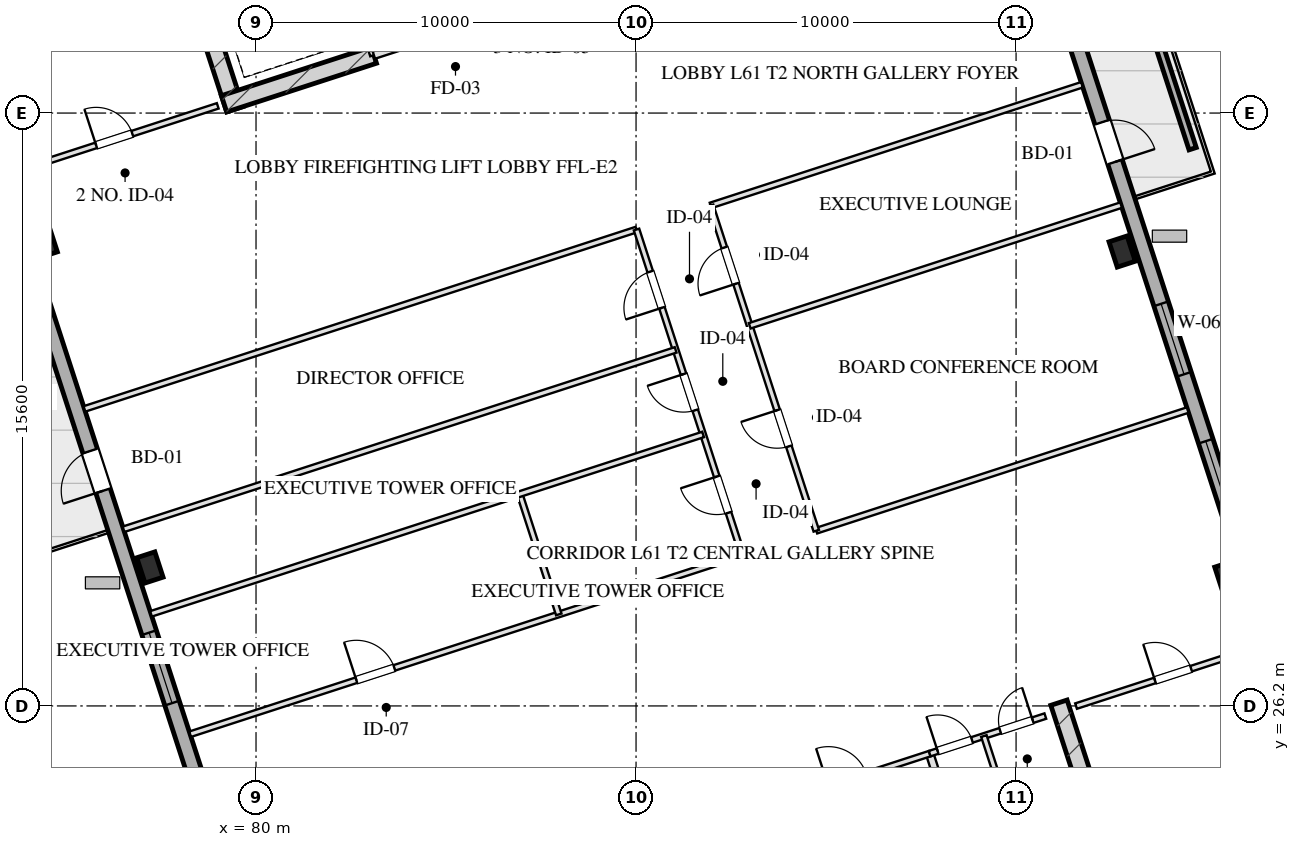
"""IFC4 building model, lengths in metres.
Left out: names, types, materials, properties, quantities, classifications, styles, units other than length and angle.
Written with IfcOpenShell. Run it as: python <this file> out.ifc"""

import sys

from ifc_helpers import new_model, si_unit, direction, frame, frame_2d, origin, origin_2d, place, context, subcontext, project, spatial, rectangle, hollow_rectangle, extrude, element, fill, save


model = new_model("IFC4")
c1 = context("Model", 3, precision=1e-05, world=origin(), true_north=direction((0.0, 1.0)))
c2 = subcontext(c1, "Body", "Model", "MODEL_VIEW")
j1 = project(units=[si_unit("LENGTHUNIT", "METRE"), si_unit("PLANEANGLEUNIT", "RADIAN")], contexts=[c1])
p1 = place(None, origin())
s1 = spatial("IfcSite", under=j1, at=p1, CompositionType="ELEMENT")
p2 = place(p1, origin())
s2 = spatial("IfcBuilding", under=s1, at=p2, CompositionType="ELEMENT")
p3 = place(p2, frame((0.0, 0.0, 226.55)))
s3 = spatial("IfcBuildingStorey", under=s2, at=p3, CompositionType="ELEMENT", Elevation=226.55)
for number, where, z_axis, x_axis in (
    (1, (101.128, 26.286, 0.0), (0.0, 0.0, 1.0), (0.309, -0.951, 0.0)),
    (2, (79.442, 41.899, 0.0), (0.0, 0.0, 1.0), (-0.309, 0.951, 0.0)),
):
    element("IfcWall", number, at=place(p3, frame(where, z_axis=z_axis, x_axis=x_axis)), inside=s3, PredefinedType="SHEAR", context=c2, shape_type="SweptSolid", body=[
        extrude(rectangle(XDim=9.33, YDim=0.45, at=frame_2d((4.665, 0.0))), origin(), (0.0, 0.0, 1.0), 3.45),
    ])
p4 = place(p3, frame((79.159, 42.043, 0.0), z_axis=(0.0, 0.0, 1.0), x_axis=(0.951047485828, 0.309044785913, 0.0)))
e3 = element("IfcWall", 3, at=p4, inside=s3, PredefinedType="SHEAR", context=c2, shape_type="SweptSolid", body=[
    extrude(rectangle(XDim=4.145, YDim=0.45, at=frame_2d((2.073, 0.0))), origin(), (0.0, 0.0, 1.0), 3.45),
])
for number, where, z_axis, x_axis in (
    (4, (77.208, 29.844, 0.0), (0.0, 0.0, 1.0), (0.951, 0.309, 0.0)),
    (5, (74.427, 38.403, 0.0), (0.0, 0.0, 1.0), (0.951, 0.309, 0.0)),
    (6, (105.573, 29.597, 0.0), (0.0, 0.0, 1.0), (0.951, 0.309, 0.0)),
    (7, (102.792, 38.156, 0.0), (0.0, 0.0, 1.0), (0.951, 0.309, 0.0)),
):
    element("IfcColumn", number, at=place(p3, frame(where, z_axis=z_axis, x_axis=x_axis)), inside=s3, PredefinedType="COLUMN", context=c2, shape_type="SweptSolid", body=[
        extrude(hollow_rectangle(XDim=0.5, YDim=0.7, WallThickness=0.025, at=origin_2d()), origin(), (0.0, 0.0, 1.0), 3.451),
    ])
p5 = place(p3, frame((82.618, 11.414, 0.0), z_axis=(0.0, 0.0, 1.0), x_axis=(-0.309016491071, 0.951056679828, 0.0)))
e8 = element("IfcWall", 8, at=p5, inside=s3, PredefinedType="SOLIDWALL", context=c2, shape_type="SweptSolid", body=[
    extrude(rectangle(XDim=38.4, YDim=0.4, at=frame_2d((19.2, 0.0))), origin(), (0.0, 0.0, 1.0), 2.55),
])
p6 = place(p5, frame((11.825, 0.0, 0.75)))
e9 = element("IfcOpeningElement", 9, at=p6, cuts=e8, PredefinedType="OPENING", context=c2, shape_type="SweptSolid", body=[
    extrude(rectangle(XDim=1.95, YDim=1.4, at=frame_2d((0.975, 0.7))), frame((0.0, 0.21, 0.0), z_axis=(0.0, -1.0, 0.0), x_axis=(1.0, 0.0, 0.0)), (0.0, 0.0, 1.0), 0.42),
])
p7 = place(p5, frame((15.625, 0.0, 0.75)))
e10 = element("IfcOpeningElement", 10, at=p7, cuts=e8, PredefinedType="OPENING", context=c2, shape_type="SweptSolid", body=[
    extrude(rectangle(XDim=1.95, YDim=1.4, at=frame_2d((0.975, 0.7))), frame((0.0, 0.21, 0.0), z_axis=(0.0, -1.0, 0.0), x_axis=(1.0, 0.0, 0.0)), (0.0, 0.0, 1.0), 0.42),
])
p8 = place(p5, frame((21.5, 0.0, 0.0)))
e11 = element("IfcOpeningElement", 11, at=p8, cuts=e8, PredefinedType="OPENING", context=c2, shape_type="SweptSolid", body=[
    extrude(rectangle(XDim=1.1, YDim=2.15, at=frame_2d((0.55, 1.075))), frame((0.0, 0.21, 0.0), z_axis=(0.0, -1.0, 0.0), x_axis=(1.0, 0.0, 0.0)), (0.0, 0.0, 1.0), 0.42),
])
p9 = place(p3, frame((97.382, 56.586, 0.0), z_axis=(0.0, 0.0, 1.0), x_axis=(0.309016491071, -0.951056679828, 0.0)))
e12 = element("IfcWall", 12, at=p9, inside=s3, PredefinedType="SOLIDWALL", context=c2, shape_type="SweptSolid", body=[
    extrude(rectangle(XDim=38.4, YDim=0.4, at=frame_2d((19.2, 0.0))), origin(), (0.0, 0.0, 1.0), 2.55),
])
p10 = place(p9, frame((24.625, 0.0, 0.75)))
e13 = element("IfcOpeningElement", 13, at=p10, cuts=e12, PredefinedType="OPENING", context=c2, shape_type="SweptSolid", body=[
    extrude(rectangle(XDim=1.95, YDim=1.4, at=frame_2d((0.975, 0.7))), frame((0.0, 0.21, 0.0), z_axis=(0.0, -1.0, 0.0), x_axis=(1.0, 0.0, 0.0)), (0.0, 0.0, 1.0), 0.42),
])
p11 = place(p9, frame((20.825, 0.0, 0.75)))
e14 = element("IfcOpeningElement", 14, at=p11, cuts=e12, PredefinedType="OPENING", context=c2, shape_type="SweptSolid", body=[
    extrude(rectangle(XDim=1.95, YDim=1.4, at=frame_2d((0.975, 0.7))), frame((0.0, 0.21, 0.0), z_axis=(0.0, -1.0, 0.0), x_axis=(1.0, 0.0, 0.0)), (0.0, 0.0, 1.0), 0.42),
])
p12 = place(p9, frame((15.8, 0.0, 0.0)))
e15 = element("IfcOpeningElement", 15, at=p12, cuts=e12, PredefinedType="OPENING", context=c2, shape_type="SweptSolid", body=[
    extrude(rectangle(XDim=1.1, YDim=2.15, at=frame_2d((0.55, 1.075))), frame((0.0, 0.21, 0.0), z_axis=(0.0, -1.0, 0.0), x_axis=(1.0, 0.0, 0.0)), (0.0, 0.0, 1.0), 0.42),
])
p13 = place(p3, frame((104.646, 40.862, 0.0), z_axis=(0.0, 0.0, 1.0), x_axis=(-0.309032019345, 0.951051634255, 0.0)))
e16 = element("IfcWall", 16, at=p13, inside=s3, PredefinedType="PARAPET", context=c2, shape_type="SweptSolid", body=[
    extrude(rectangle(XDim=4.8, YDim=0.2, at=frame_2d((2.4, 0.0))), origin(), (0.0, 0.0, 1.0), 0.75),
])
p14 = place(p3, frame((97.727, 24.944, 0.0), z_axis=(0.0, 0.0, 1.0), x_axis=(0.309016001439, -0.951056838919, 0.0)))
e17 = element("IfcWall", 17, at=p14, inside=s3, PredefinedType="PARTITIONING", context=c2, shape_type="SweptSolid", body=[
    extrude(rectangle(XDim=8.43, YDim=0.2, at=frame_2d((4.215, 0.0))), origin(), (0.0, 0.0, 1.0), 3.155),
])
p15 = place(p3, frame((93.542, 23.585, 0.0), z_axis=(0.0, 0.0, 1.0), x_axis=(0.951063829732, 0.308994485023, 0.0)))
e18 = element("IfcWall", 18, at=p15, inside=s3, PredefinedType="PARTITIONING", context=c2, shape_type="SweptSolid", body=[
    extrude(rectangle(XDim=4.4, YDim=0.15, at=frame_2d((2.2, 0.0))), origin(), (0.0, 0.0, 1.0), 3.155),
])
p16 = place(p15, frame((1.6, 0.0, 0.0)))
e19 = element("IfcOpeningElement", 19, at=p16, cuts=e18, PredefinedType="OPENING", context=c2, shape_type="SweptSolid", body=[
    extrude(rectangle(XDim=1.05, YDim=2.05, at=frame_2d((0.525, 1.025))), frame((0.0, 0.085, 0.0), z_axis=(0.0, -1.0, 0.0), x_axis=(1.0, 0.0, 0.0)), (0.0, 0.0, 1.0), 0.17),
])
p17 = place(p3, frame((97.727, 24.944, 0.0), z_axis=(0.0, 0.0, 1.0), x_axis=(0.951036872128, 0.309077446369, 0.0)))
e20 = element("IfcWall", 20, at=p17, inside=s3, PredefinedType="PARTITIONING", context=c2, shape_type="SweptSolid", body=[
    extrude(rectangle(XDim=3.2, YDim=0.15, at=frame_2d((1.6, 0.0))), origin(), (0.0, 0.0, 1.0), 3.155),
])
p18 = place(p17, frame((0.22, 0.0, 0.0)))
e21 = element("IfcOpeningElement", 21, at=p18, cuts=e20, PredefinedType="OPENING", context=c2, shape_type="SweptSolid", body=[
    extrude(rectangle(XDim=0.95, YDim=2.05, at=frame_2d((0.475, 1.025))), frame((0.0, 0.085, 0.0), z_axis=(0.0, -1.0, 0.0), x_axis=(1.0, 0.0, 0.0)), (0.0, 0.0, 1.0), 0.17),
])
p19 = place(p17, frame((1.95, 0.0, 0.0)))
e22 = element("IfcOpeningElement", 22, at=p19, cuts=e20, PredefinedType="OPENING", context=c2, shape_type="SweptSolid", body=[
    extrude(rectangle(XDim=0.9, YDim=2.05, at=frame_2d((0.45, 1.025))), frame((0.0, 0.085, 0.0), z_axis=(0.0, -1.0, 0.0), x_axis=(1.0, 0.0, 0.0)), (0.0, 0.0, 1.0), 0.17),
])
p20 = place(p3, frame((99.153, 25.408, 0.0), z_axis=(0.0, 0.0, 1.0), x_axis=(0.309016001439, -0.951056838919, 0.0)))
e23 = element("IfcWall", 23, at=p20, inside=s3, PredefinedType="PARTITIONING", context=c2, shape_type="SweptSolid", body=[
    extrude(rectangle(XDim=8.43, YDim=0.15, at=frame_2d((4.215, 0.0))), origin(), (0.0, 0.0, 1.0), 3.155),
])
p21 = place(p20, frame((2.55, 0.0, 0.0)))
e24 = element("IfcOpeningElement", 24, at=p21, cuts=e23, PredefinedType="OPENING", context=c2, shape_type="SweptSolid", body=[
    extrude(rectangle(XDim=0.95, YDim=2.05, at=frame_2d((0.475, 1.025))), frame((0.0, 0.085, 0.0), z_axis=(0.0, -1.0, 0.0), x_axis=(1.0, 0.0, 0.0)), (0.0, 0.0, 1.0), 0.17),
])
p22 = place(p20, frame((5.6, 0.0, 0.0)))
e25 = element("IfcOpeningElement", 25, at=p22, cuts=e23, PredefinedType="OPENING", context=c2, shape_type="SweptSolid", body=[
    extrude(rectangle(XDim=0.9, YDim=2.05, at=frame_2d((0.45, 1.025))), frame((0.0, 0.085, 0.0), z_axis=(0.0, -1.0, 0.0), x_axis=(1.0, 0.0, 0.0)), (0.0, 0.0, 1.0), 0.17),
])
p23 = place(p3, frame((83.101, 43.324, 0.0), z_axis=(0.0, 0.0, 1.0), x_axis=(-0.309048298632, 0.951046344356, 0.0)))
e26 = element("IfcWall", 26, at=p23, inside=s3, PredefinedType="PARTITIONING", context=c2, shape_type="SweptSolid", body=[
    extrude(rectangle(XDim=1.9, YDim=0.2, at=frame_2d((0.95, 0.0))), origin(), (0.0, 0.0, 1.0), 3.155),
])
p24 = place(p23, frame((0.52, 0.0, 0.0)))
e27 = element("IfcOpeningElement", 27, at=p24, cuts=e26, PredefinedType="OPENING", context=c2, shape_type="SweptSolid", body=[
    extrude(rectangle(XDim=1.1, YDim=2.05, at=frame_2d((0.55, 1.025))), frame((0.0, 0.11, 0.0), z_axis=(0.0, -1.0, 0.0), x_axis=(1.0, 0.0, 0.0)), (0.0, 0.0, 1.0), 0.22),
])
p25 = place(p3, frame((83.101, 43.324, 0.0), z_axis=(0.0, 0.0, 1.0), x_axis=(0.951052804469, 0.309028417967, 0.0)))
e28 = element("IfcWall", 28, at=p25, inside=s3, PredefinedType="PARTITIONING", context=c2, shape_type="SweptSolid", body=[
    extrude(rectangle(XDim=3.83, YDim=0.2, at=frame_2d((1.915, 0.0))), origin(), (0.0, 0.0, 1.0), 3.155),
])
p26 = place(p25, frame((1.35, 0.0, 0.0)))
e29 = element("IfcOpeningElement", 29, at=p26, cuts=e28, PredefinedType="OPENING", context=c2, shape_type="SweptSolid", body=[
    extrude(rectangle(XDim=1.2, YDim=2.05, at=frame_2d((0.6, 1.025))), frame((0.0, 0.11, 0.0), z_axis=(0.0, -1.0, 0.0), x_axis=(1.0, 0.0, 0.0)), (0.0, 0.0, 1.0), 0.22),
])
p27 = place(p3, frame((101.578, 26.196, 0.0), z_axis=(0.0, 0.0, 1.0), x_axis=(0.951064427824, 0.308992644131, 0.0)))
e30 = element("IfcWall", 30, at=p27, inside=s3, PredefinedType="PARTITIONING", context=c2, shape_type="SweptSolid", body=[
    extrude(rectangle(XDim=5.2, YDim=0.15, at=frame_2d((2.6, 0.0))), origin(), (0.0, 0.0, 1.0), 3.155),
])
p28 = place(p27, frame((2.184, 0.0, 0.0)))
e31 = element("IfcOpeningElement", 31, at=p28, cuts=e30, PredefinedType="OPENING", context=c2, shape_type="SweptSolid", body=[
    extrude(rectangle(XDim=1.0, YDim=2.05, at=frame_2d((0.5, 1.025))), frame((0.0, 0.085, 0.0), z_axis=(0.0, -1.0, 0.0), x_axis=(1.0, 0.0, 0.0)), (0.0, 0.0, 1.0), 0.17),
])
p29 = place(p3, frame((73.476, 40.197, 0.0), z_axis=(0.0, 0.0, 1.0), x_axis=(0.951059431056, 0.309008023519, 0.0)))
e32 = element("IfcWall", 32, at=p29, inside=s3, PredefinedType="PARTITIONING", context=c2, shape_type="SweptSolid", body=[
    extrude(rectangle(XDim=5.8, YDim=0.15, at=frame_2d((2.9, 0.0))), origin(), (0.0, 0.0, 1.0), 3.155),
])
p30 = place(p29, frame((2.436, 0.0, 0.0)))
e33 = element("IfcOpeningElement", 33, at=p30, cuts=e32, PredefinedType="OPENING", context=c2, shape_type="SweptSolid", body=[
    extrude(rectangle(XDim=1.0, YDim=2.05, at=frame_2d((0.5, 1.025))), frame((0.0, 0.085, 0.0), z_axis=(0.0, -1.0, 0.0), x_axis=(1.0, 0.0, 0.0)), (0.0, 0.0, 1.0), 0.17),
])
p31 = place(p3, frame((78.266, 25.456, 0.0), z_axis=(0.0, 0.0, 1.0), x_axis=(0.951056617779, 0.30901668204, 0.0)))
e34 = element("IfcWall", 34, at=p31, inside=s3, PredefinedType="PARTITIONING", context=c2, shape_type="SweptSolid", body=[
    extrude(rectangle(XDim=15.275, YDim=0.15, at=frame_2d((7.637, 0.0))), origin(), (0.0, 0.0, 1.0), 3.155),
])
p32 = place(p31, frame((4.6, 0.0, 0.0)))
e35 = element("IfcOpeningElement", 35, at=p32, cuts=e34, PredefinedType="OPENING", context=c2, shape_type="SweptSolid", body=[
    extrude(rectangle(XDim=1.05, YDim=2.05, at=frame_2d((0.525, 1.025))), frame((0.0, 0.085, 0.0), z_axis=(0.0, -1.0, 0.0), x_axis=(1.0, 0.0, 0.0)), (0.0, 0.0, 1.0), 0.17),
])
p33 = place(p3, frame((94.743, 30.81, 0.0), z_axis=(0.0, 0.0, 1.0), x_axis=(0.951058162647, 0.309011927378, 0.0)))
e36 = element("IfcWall", 36, at=p33, inside=s3, PredefinedType="PARTITIONING", context=c2, shape_type="SweptSolid", body=[
    extrude(rectangle(XDim=10.275, YDim=0.15, at=frame_2d((5.137, 0.0))), origin(), (0.0, 0.0, 1.0), 3.155),
])
p34 = place(p3, frame((75.485, 34.015, 0.0), z_axis=(0.0, 0.0, 1.0), x_axis=(0.951056617779, 0.30901668204, 0.0)))
e37 = element("IfcWall", 37, at=p34, inside=s3, PredefinedType="PARTITIONING", context=c2, shape_type="SweptSolid", body=[
    extrude(rectangle(XDim=15.275, YDim=0.15, at=frame_2d((7.637, 0.0))), origin(), (0.0, 0.0, 1.0), 3.155),
])
p35 = place(p3, frame((91.962, 39.369, 0.0), z_axis=(0.0, 0.0, 1.0), x_axis=(0.951058162647, 0.309011927378, 0.0)))
e38 = element("IfcWall", 38, at=p35, inside=s3, PredefinedType="PARTITIONING", context=c2, shape_type="SweptSolid", body=[
    extrude(rectangle(XDim=10.275, YDim=0.15, at=frame_2d((5.137, 0.0))), origin(), (0.0, 0.0, 1.0), 3.155),
])
p36 = place(p3, frame((92.793, 30.176, 0.0), z_axis=(0.0, 0.0, 1.0), x_axis=(-0.309024734286, 0.951054001411, 0.0)))
e39 = element("IfcWall", 39, at=p36, inside=s3, PredefinedType="PARTITIONING", context=c2, shape_type="SweptSolid", body=[
    extrude(rectangle(XDim=9.0, YDim=0.15, at=frame_2d((4.5, 0.0))), origin(), (0.0, 0.0, 1.0), 3.155),
])
p37 = place(p36, frame((1.165, 0.0, 0.0)))
e40 = element("IfcOpeningElement", 40, at=p37, cuts=e39, PredefinedType="OPENING", context=c2, shape_type="SweptSolid", body=[
    extrude(rectangle(XDim=1.0, YDim=2.05, at=frame_2d((0.5, 1.025))), frame((0.0, 0.085, 0.0), z_axis=(0.0, -1.0, 0.0), x_axis=(1.0, 0.0, 0.0)), (0.0, 0.0, 1.0), 0.17),
])
p38 = place(p36, frame((4.0, 0.0, 0.0)))
e41 = element("IfcOpeningElement", 41, at=p38, cuts=e39, PredefinedType="OPENING", context=c2, shape_type="SweptSolid", body=[
    extrude(rectangle(XDim=1.0, YDim=2.05, at=frame_2d((0.5, 1.025))), frame((0.0, 0.085, 0.0), z_axis=(0.0, -1.0, 0.0), x_axis=(1.0, 0.0, 0.0)), (0.0, 0.0, 1.0), 0.17),
])
p39 = place(p36, frame((6.835, 0.0, 0.0)))
e42 = element("IfcOpeningElement", 42, at=p39, cuts=e39, PredefinedType="OPENING", context=c2, shape_type="SweptSolid", body=[
    extrude(rectangle(XDim=1.0, YDim=2.05, at=frame_2d((0.5, 1.025))), frame((0.0, 0.085, 0.0), z_axis=(0.0, -1.0, 0.0), x_axis=(1.0, 0.0, 0.0)), (0.0, 0.0, 1.0), 0.17),
])
p40 = place(p3, frame((94.743, 30.81, 0.0), z_axis=(0.0, 0.0, 1.0), x_axis=(-0.309024734286, 0.951054001411, 0.0)))
e43 = element("IfcWall", 43, at=p40, inside=s3, PredefinedType="PARTITIONING", context=c2, shape_type="SweptSolid", body=[
    extrude(rectangle(XDim=9.0, YDim=0.15, at=frame_2d((4.5, 0.0))), origin(), (0.0, 0.0, 1.0), 3.155),
])
p41 = place(p40, frame((2.335, 0.0, 0.0)))
e44 = element("IfcOpeningElement", 44, at=p41, cuts=e43, PredefinedType="OPENING", context=c2, shape_type="SweptSolid", body=[
    extrude(rectangle(XDim=1.0, YDim=2.05, at=frame_2d((0.5, 1.025))), frame((0.0, 0.085, 0.0), z_axis=(0.0, -1.0, 0.0), x_axis=(1.0, 0.0, 0.0)), (0.0, 0.0, 1.0), 0.17),
])
p42 = place(p40, frame((6.835, 0.0, 0.0)))
e45 = element("IfcOpeningElement", 45, at=p42, cuts=e43, PredefinedType="OPENING", context=c2, shape_type="SweptSolid", body=[
    extrude(rectangle(XDim=1.0, YDim=2.05, at=frame_2d((0.5, 1.025))), frame((0.0, 0.085, 0.0), z_axis=(0.0, -1.0, 0.0), x_axis=(1.0, 0.0, 0.0)), (0.0, 0.0, 1.0), 0.17),
])
p43 = place(p3, frame((87.967, 28.608, 0.0), z_axis=(0.0, 0.0, 1.0), x_axis=(-0.309004845045, 0.951060463766, 0.0)))
e46 = element("IfcWall", 46, at=p43, inside=s3, PredefinedType="PARTITIONING", context=c2, shape_type="SweptSolid", body=[
    extrude(rectangle(XDim=3.33, YDim=0.15, at=frame_2d((1.665, 0.0))), origin(), (0.0, 0.0, 1.0), 3.155),
])
for number, where, z_axis, x_axis in (
    (47, (77.237, 28.623, 0.0), (0.0, 0.0, 1.0), (0.951, 0.309, 0.0)),
    (48, (76.514, 30.848, 0.0), (0.0, 0.0, 1.0), (0.951, 0.309, 0.0)),
):
    element("IfcWall", number, at=place(p3, frame(where, z_axis=z_axis, x_axis=x_axis)), inside=s3, PredefinedType="PARTITIONING", context=c2, shape_type="SweptSolid", body=[
        extrude(rectangle(XDim=15.275, YDim=0.15, at=frame_2d((7.637, 0.0))), origin(), (0.0, 0.0, 1.0), 3.155),
    ])
p44 = place(p3, frame((92.991, 36.202, 0.0), z_axis=(0.0, 0.0, 1.0), x_axis=(0.951051179373, 0.309033419251, 0.0)))
e49 = element("IfcWall", 49, at=p44, inside=s3, PredefinedType="PARTITIONING", context=c2, shape_type="SweptSolid", body=[
    extrude(rectangle(XDim=10.275, YDim=0.15, at=frame_2d((5.137, 0.0))), origin(), (0.0, 0.0, 1.0), 3.155),
])
p45 = place(p7, origin())
e50 = element("IfcWindow", 50, at=p45, inside=s3, PartitioningType="TRIPLE_PANEL_VERTICAL", PredefinedType="WINDOW", context=c2, shape_type="SweptSolid", body=[
    extrude(rectangle(XDim=1.95, YDim=1.4, at=frame_2d((0.975, 0.7))), frame((0.0, 0.03, 0.0), z_axis=(0.0, -1.0, 0.0), x_axis=(1.0, 0.0, 0.0)), (0.0, 0.0, 1.0), 0.06),
])
fill(e10, e50)
p46 = place(p10, origin())
e51 = element("IfcWindow", 51, at=p46, inside=s3, PartitioningType="TRIPLE_PANEL_VERTICAL", PredefinedType="WINDOW", context=c2, shape_type="SweptSolid", body=[
    extrude(rectangle(XDim=1.95, YDim=1.4, at=frame_2d((0.975, 0.7))), frame((0.0, 0.03, 0.0), z_axis=(0.0, -1.0, 0.0), x_axis=(1.0, 0.0, 0.0)), (0.0, 0.0, 1.0), 0.06),
])
fill(e13, e51)
p47 = place(p11, origin())
e52 = element("IfcWindow", 52, at=p47, inside=s3, PartitioningType="TRIPLE_PANEL_VERTICAL", PredefinedType="WINDOW", context=c2, shape_type="SweptSolid", body=[
    extrude(rectangle(XDim=1.95, YDim=1.4, at=frame_2d((0.975, 0.7))), frame((0.0, 0.03, 0.0), z_axis=(0.0, -1.0, 0.0), x_axis=(1.0, 0.0, 0.0)), (0.0, 0.0, 1.0), 0.06),
])
fill(e14, e52)
p48 = place(p8, origin())
e53 = element("IfcDoor", 53, at=p48, inside=s3, OperationType="SINGLE_SWING_LEFT", PredefinedType="DOOR", context=c2, shape_type="SweptSolid", body=[
    extrude(rectangle(XDim=1.1, YDim=2.15, at=frame_2d((0.55, 1.075))), frame((0.0, 0.025, 0.0), z_axis=(0.0, -1.0, 0.0), x_axis=(1.0, 0.0, 0.0)), (0.0, 0.0, 1.0), 0.05),
])
fill(e11, e53)
p49 = place(p12, origin())
e54 = element("IfcDoor", 54, at=p49, inside=s3, OperationType="SINGLE_SWING_RIGHT", PredefinedType="DOOR", context=c2, shape_type="SweptSolid", body=[
    extrude(rectangle(XDim=1.1, YDim=2.15, at=frame_2d((0.55, 1.075))), frame((0.0, 0.025, 0.0), z_axis=(0.0, -1.0, 0.0), x_axis=(1.0, 0.0, 0.0)), (0.0, 0.0, 1.0), 0.05),
])
fill(e15, e54)
p50 = place(p18, origin())
e55 = element("IfcDoor", 55, at=p50, inside=s3, OperationType="SINGLE_SWING_LEFT", PredefinedType="DOOR", context=c2, shape_type="SweptSolid", body=[
    extrude(rectangle(XDim=0.95, YDim=2.05, at=frame_2d((0.475, 1.025))), frame((0.0, 0.025, 0.0), z_axis=(0.0, -1.0, 0.0), x_axis=(1.0, 0.0, 0.0)), (0.0, 0.0, 1.0), 0.05),
])
fill(e21, e55)
p51 = place(p19, origin())
e56 = element("IfcDoor", 56, at=p51, inside=s3, OperationType="SINGLE_SWING_RIGHT", PredefinedType="DOOR", context=c2, shape_type="SweptSolid", body=[
    extrude(rectangle(XDim=0.9, YDim=2.05, at=frame_2d((0.45, 1.025))), frame((0.0, 0.025, 0.0), z_axis=(0.0, -1.0, 0.0), x_axis=(1.0, 0.0, 0.0)), (0.0, 0.0, 1.0), 0.05),
])
fill(e22, e56)
p52 = place(p28, origin())
e57 = element("IfcDoor", 57, at=p52, inside=s3, OperationType="SINGLE_SWING_LEFT", PredefinedType="DOOR", context=c2, shape_type="SweptSolid", body=[
    extrude(rectangle(XDim=1.0, YDim=2.05, at=frame_2d((0.5, 1.025))), frame((0.0, 0.025, 0.0), z_axis=(0.0, -1.0, 0.0), x_axis=(1.0, 0.0, 0.0)), (0.0, 0.0, 1.0), 0.05),
])
fill(e31, e57)
p53 = place(p30, origin())
e58 = element("IfcDoor", 58, at=p53, inside=s3, OperationType="SINGLE_SWING_LEFT", PredefinedType="DOOR", context=c2, shape_type="SweptSolid", body=[
    extrude(rectangle(XDim=1.0, YDim=2.05, at=frame_2d((0.5, 1.025))), frame((0.0, 0.025, 0.0), z_axis=(0.0, -1.0, 0.0), x_axis=(1.0, 0.0, 0.0)), (0.0, 0.0, 1.0), 0.05),
])
fill(e33, e58)
p54 = place(p32, origin())
e59 = element("IfcDoor", 59, at=p54, inside=s3, OperationType="SINGLE_SWING_LEFT", PredefinedType="DOOR", context=c2, shape_type="SweptSolid", body=[
    extrude(rectangle(XDim=1.05, YDim=2.05, at=frame_2d((0.525, 1.025))), frame((0.0, 0.025, 0.0), z_axis=(0.0, -1.0, 0.0), x_axis=(1.0, 0.0, 0.0)), (0.0, 0.0, 1.0), 0.05),
])
fill(e35, e59)
p55 = place(p37, origin())
e60 = element("IfcDoor", 60, at=p55, inside=s3, OperationType="SINGLE_SWING_RIGHT", PredefinedType="DOOR", context=c2, shape_type="SweptSolid", body=[
    extrude(rectangle(XDim=1.0, YDim=2.05, at=frame_2d((0.5, 1.025))), frame((0.0, 0.025, 0.0), z_axis=(0.0, -1.0, 0.0), x_axis=(1.0, 0.0, 0.0)), (0.0, 0.0, 1.0), 0.05),
])
fill(e40, e60)
p56 = place(p38, origin())
e61 = element("IfcDoor", 61, at=p56, inside=s3, OperationType="SINGLE_SWING_RIGHT", PredefinedType="DOOR", context=c2, shape_type="SweptSolid", body=[
    extrude(rectangle(XDim=1.0, YDim=2.05, at=frame_2d((0.5, 1.025))), frame((0.0, 0.025, 0.0), z_axis=(0.0, -1.0, 0.0), x_axis=(1.0, 0.0, 0.0)), (0.0, 0.0, 1.0), 0.05),
])
fill(e41, e61)
p57 = place(p39, origin())
e62 = element("IfcDoor", 62, at=p57, inside=s3, OperationType="SINGLE_SWING_LEFT", PredefinedType="DOOR", context=c2, shape_type="SweptSolid", body=[
    extrude(rectangle(XDim=1.0, YDim=2.05, at=frame_2d((0.5, 1.025))), frame((0.0, 0.025, 0.0), z_axis=(0.0, -1.0, 0.0), x_axis=(1.0, 0.0, 0.0)), (0.0, 0.0, 1.0), 0.05),
])
fill(e42, e62)
p58 = place(p41, origin())
e63 = element("IfcDoor", 63, at=p58, inside=s3, OperationType="SINGLE_SWING_RIGHT", PredefinedType="DOOR", context=c2, shape_type="SweptSolid", body=[
    extrude(rectangle(XDim=1.0, YDim=2.05, at=frame_2d((0.5, 1.025))), frame((0.0, 0.025, 0.0), z_axis=(0.0, -1.0, 0.0), x_axis=(1.0, 0.0, 0.0)), (0.0, 0.0, 1.0), 0.05),
])
fill(e44, e63)
p59 = place(p42, origin())
e64 = element("IfcDoor", 64, at=p59, inside=s3, OperationType="SINGLE_SWING_LEFT", PredefinedType="DOOR", context=c2, shape_type="SweptSolid", body=[
    extrude(rectangle(XDim=1.0, YDim=2.05, at=frame_2d((0.5, 1.025))), frame((0.0, 0.025, 0.0), z_axis=(0.0, -1.0, 0.0), x_axis=(1.0, 0.0, 0.0)), (0.0, 0.0, 1.0), 0.05),
])
fill(e45, e64)
save(model, sys.argv[1])
